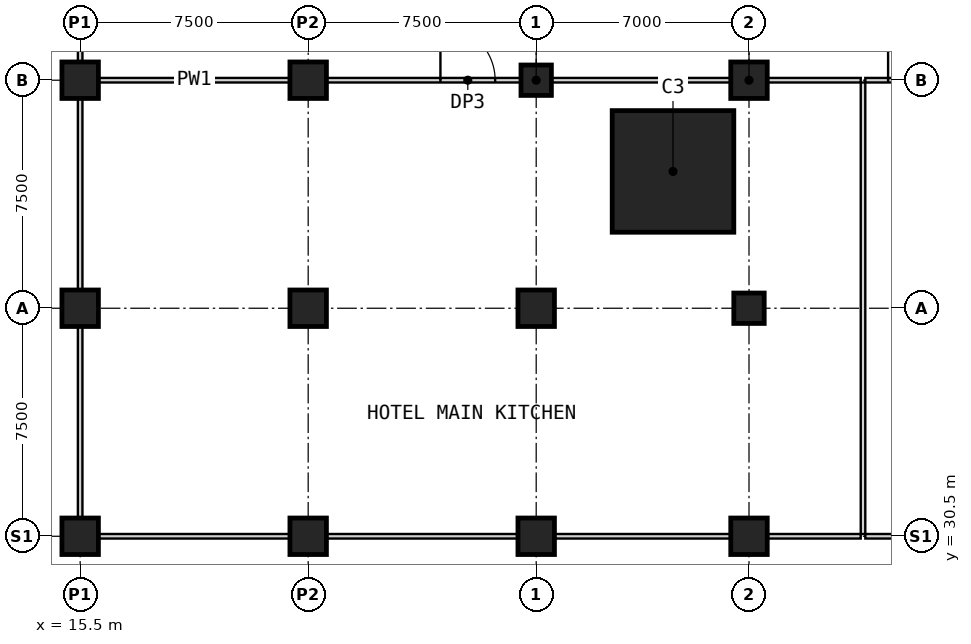
"""IFC4 building model, lengths in metres.
Left out: names, types, materials, properties, quantities, classifications, styles, units other than length and angle.
Written with IfcOpenShell. Run it as: python <this file> out.ifc"""

import sys

from ifc_helpers import new_model, si_unit, direction, frame, frame_2d, origin, origin_2d, place, context, subcontext, project, spatial, rectangle, extrude, element, fill, save


model = new_model("IFC4")
c1 = context("Model", 3, precision=1e-05, world=origin(), true_north=direction((0.0, 1.0)))
c2 = subcontext(c1, "Body", "Model", "MODEL_VIEW")
j1 = project(units=[si_unit("LENGTHUNIT", "METRE"), si_unit("PLANEANGLEUNIT", "RADIAN")], contexts=[c1])
p1 = place(None, origin())
s1 = spatial("IfcSite", under=j1, at=p1, CompositionType="ELEMENT")
p2 = place(p1, origin())
s2 = spatial("IfcBuilding", under=s1, at=p2, CompositionType="ELEMENT")
p3 = place(p2, frame((0.0, 0.0, -6.0)))
s3 = spatial("IfcBuildingStorey", under=s2, at=p3, CompositionType="ELEMENT", Elevation=-6.0)
for number, where, z_axis, x_axis in (
    (1, (30.5, 45.5, 0.0), (0.0, 0.0, 1.0), (1.0, 0.0, 0.0)),
    (2, (37.5, 38.0, 0.0), (0.0, 0.0, 1.0), (1.0, 0.0, 0.0)),
):
    element("IfcColumn", number, at=place(p3, frame(where, z_axis=z_axis, x_axis=x_axis)), inside=s3, PredefinedType="COLUMN", context=c2, shape_type="SweptSolid", body=[
        extrude(rectangle(XDim=1.0, YDim=1.0, at=origin_2d()), origin(), (0.0, 0.0, 1.0), 6.0),
    ])
p4 = place(p3, frame((37.5, 45.5, 0.0), z_axis=(0.0, 0.0, 1.0), x_axis=(1.0, 0.0, 0.0)))
e3 = element("IfcColumn", 3, at=p4, inside=s3, PredefinedType="COLUMN", context=c2, shape_type="SweptSolid", body=[
    extrude(rectangle(XDim=1.2, YDim=1.2, at=origin_2d()), origin(), (0.0, 0.0, 1.0), 6.0),
])
p5 = place(p3, frame((35.0, 42.5, 0.0), z_axis=(0.0, 0.0, 1.0), x_axis=(1.0, 0.0, 0.0)))
e4 = element("IfcColumn", 4, at=p5, inside=s3, PredefinedType="COLUMN", context=c2, shape_type="SweptSolid", body=[
    extrude(rectangle(XDim=4.0, YDim=4.0, at=origin_2d()), origin(), (0.0, 0.0, 1.0), 6.0),
])
for number, where, z_axis, x_axis in (
    (5, (15.5, 30.5, 0.0), (0.0, 0.0, 1.0), (1.0, 0.0, 0.0)),
    (6, (15.5, 38.0, 0.0), (0.0, 0.0, 1.0), (1.0, 0.0, 0.0)),
    (7, (15.5, 45.5, 0.0), (0.0, 0.0, 1.0), (1.0, 0.0, 0.0)),
    (8, (23.0, 30.5, 0.0), (0.0, 0.0, 1.0), (1.0, 0.0, 0.0)),
    (9, (23.0, 38.0, 0.0), (0.0, 0.0, 1.0), (1.0, 0.0, 0.0)),
    (10, (23.0, 45.5, 0.0), (0.0, 0.0, 1.0), (1.0, 0.0, 0.0)),
    (11, (30.5, 30.5, 0.0), (0.0, 0.0, 1.0), (1.0, 0.0, 0.0)),
    (12, (30.5, 38.0, 0.0), (0.0, 0.0, 1.0), (1.0, 0.0, 0.0)),
    (13, (37.5, 30.5, 0.0), (0.0, 0.0, 1.0), (1.0, 0.0, 0.0)),
):
    element("IfcColumn", number, at=place(p3, frame(where, z_axis=z_axis, x_axis=x_axis)), inside=s3, PredefinedType="COLUMN", context=c2, shape_type="SweptSolid", body=[
        extrude(rectangle(XDim=1.2, YDim=1.2, at=origin_2d()), origin(), (0.0, 0.0, 1.0), 6.0),
    ])
p6 = place(p3, frame((16.1, 45.5, 0.0), z_axis=(0.0, 0.0, 1.0), x_axis=(1.0, 0.0, 0.0)))
e14 = element("IfcWall", 14, at=p6, inside=s3, PredefinedType="PARTITIONING", context=c2, shape_type="SweptSolid", body=[
    extrude(rectangle(XDim=6.3, YDim=0.15, at=frame_2d((3.15, 0.0))), origin(), (0.0, 0.0, 1.0), 5.7),
])
p7 = place(p3, frame((23.6, 45.5, 0.0), z_axis=(0.0, 0.0, 1.0), x_axis=(1.0, 0.0, 0.0)))
e15 = element("IfcWall", 15, at=p7, inside=s3, PredefinedType="PARTITIONING", context=c2, shape_type="SweptSolid", body=[
    extrude(rectangle(XDim=6.4, YDim=0.15, at=frame_2d((3.2, 0.0))), origin(), (0.0, 0.0, 1.0), 5.7),
])
p8 = place(p7, frame((3.75, 0.0, 0.0)))
e16 = element("IfcOpeningElement", 16, at=p8, cuts=e15, PredefinedType="OPENING", context=c2, shape_type="SweptSolid", body=[
    extrude(rectangle(XDim=1.8, YDim=2.4, at=frame_2d((0.9, 1.2))), frame((0.0, 0.085, 0.0), z_axis=(0.0, -1.0, 0.0), x_axis=(1.0, 0.0, 0.0)), (0.0, 0.0, 1.0), 0.17),
])
p9 = place(p3, frame((31.0, 45.5, 0.0), z_axis=(0.0, 0.0, 1.0), x_axis=(1.0, 0.0, 0.0)))
e17 = element("IfcWall", 17, at=p9, inside=s3, PredefinedType="PARTITIONING", context=c2, shape_type="SweptSolid", body=[
    extrude(rectangle(XDim=5.9, YDim=0.15, at=frame_2d((2.95, 0.0))), origin(), (0.0, 0.0, 1.0), 5.7),
])
p10 = place(p3, frame((38.1, 45.5, 0.0), z_axis=(0.0, 0.0, 1.0), x_axis=(1.0, 0.0, 0.0)))
e18 = element("IfcWall", 18, at=p10, inside=s3, PredefinedType="PARTITIONING", context=c2, shape_type="SweptSolid", body=[
    extrude(rectangle(XDim=3.075, YDim=0.15, at=frame_2d((1.538, 0.0))), origin(), (0.0, 0.0, 1.0), 5.7),
])
p11 = place(p3, frame((41.325, 45.5, 0.0), z_axis=(0.0, 0.0, 1.0), x_axis=(1.0, 0.0, 0.0)))
e19 = element("IfcWall", 19, at=p11, inside=s3, PredefinedType="PARTITIONING", context=c2, shape_type="SweptSolid", body=[
    extrude(rectangle(XDim=3.075, YDim=0.15, at=frame_2d((1.538, 0.0))), origin(), (0.0, 0.0, 1.0), 5.7),
])
p12 = place(p11, frame((0.75, 0.0, 0.0)))
e20 = element("IfcOpeningElement", 20, at=p12, cuts=e19, PredefinedType="OPENING", context=c2, shape_type="SweptSolid", body=[
    extrude(rectangle(XDim=1.8, YDim=2.4, at=frame_2d((0.9, 1.2))), frame((0.0, 0.085, 0.0), z_axis=(0.0, -1.0, 0.0), x_axis=(1.0, 0.0, 0.0)), (0.0, 0.0, 1.0), 0.17),
])
for number, where, z_axis, x_axis in (
    (21, (16.1, 30.5, 0.0), (0.0, 0.0, 1.0), (1.0, 0.0, 0.0)),
    (22, (23.6, 30.5, 0.0), (0.0, 0.0, 1.0), (1.0, 0.0, 0.0)),
):
    element("IfcWall", number, at=place(p3, frame(where, z_axis=z_axis, x_axis=x_axis)), inside=s3, PredefinedType="PARTITIONING", context=c2, shape_type="SweptSolid", body=[
        extrude(rectangle(XDim=6.3, YDim=0.15, at=frame_2d((3.15, 0.0))), origin(), (0.0, 0.0, 1.0), 5.1),
    ])
p13 = place(p3, frame((31.1, 30.5, 0.0), z_axis=(0.0, 0.0, 1.0), x_axis=(1.0, 0.0, 0.0)))
e23 = element("IfcWall", 23, at=p13, inside=s3, PredefinedType="PARTITIONING", context=c2, shape_type="SweptSolid", body=[
    extrude(rectangle(XDim=5.8, YDim=0.15, at=frame_2d((2.9, 0.0))), origin(), (0.0, 0.0, 1.0), 5.1),
])
for number, where, z_axis, x_axis in (
    (24, (38.1, 30.5, 0.0), (0.0, 0.0, 1.0), (1.0, 0.0, 0.0)),
    (25, (41.325, 30.5, 0.0), (0.0, 0.0, 1.0), (1.0, 0.0, 0.0)),
):
    element("IfcWall", number, at=place(p3, frame(where, z_axis=z_axis, x_axis=x_axis)), inside=s3, PredefinedType="PARTITIONING", context=c2, shape_type="SweptSolid", body=[
        extrude(rectangle(XDim=3.075, YDim=0.15, at=frame_2d((1.538, 0.0))), origin(), (0.0, 0.0, 1.0), 5.1),
    ])
for number, where, z_axis, x_axis in (
    (26, (15.5, 31.1, 0.0), (0.0, 0.0, 1.0), (0.0, 1.0, 0.0)),
    (27, (15.5, 38.6, 0.0), (0.0, 0.0, 1.0), (0.0, 1.0, 0.0)),
):
    element("IfcWall", number, at=place(p3, frame(where, z_axis=z_axis, x_axis=x_axis)), inside=s3, PredefinedType="PARTITIONING", context=c2, shape_type="SweptSolid", body=[
        extrude(rectangle(XDim=6.3, YDim=0.15, at=frame_2d((3.15, 0.0))), origin(), (0.0, 0.0, 1.0), 5.1),
    ])
p14 = place(p3, frame((15.5, 46.1, 0.0), z_axis=(0.0, 0.0, 1.0), x_axis=(0.0, 1.0, 0.0)))
e28 = element("IfcWall", 28, at=p14, inside=s3, PredefinedType="PARTITIONING", context=c2, shape_type="SweptSolid", body=[
    extrude(rectangle(XDim=5.8, YDim=0.15, at=frame_2d((2.9, 0.0))), origin(), (0.0, 0.0, 1.0), 5.1),
])
p15 = place(p3, frame((41.25, 30.575, 0.0), z_axis=(0.0, 0.0, 1.0), x_axis=(0.0, 1.0, 0.0)))
e29 = element("IfcWall", 29, at=p15, inside=s3, PredefinedType="PARTITIONING", context=c2, shape_type="SweptSolid", body=[
    extrude(rectangle(XDim=14.85, YDim=0.15, at=frame_2d((7.425, 0.0))), origin(), (0.0, 0.0, 1.0), 5.1),
])
p16 = place(p8, origin())
e30 = element("IfcDoor", 30, at=p16, inside=s3, OperationType="SINGLE_SWING_LEFT", PredefinedType="DOOR", context=c2, shape_type="SweptSolid", body=[
    extrude(rectangle(XDim=1.8, YDim=2.4, at=frame_2d((0.9, 1.2))), frame((0.0, 0.025, 0.0), z_axis=(0.0, -1.0, 0.0), x_axis=(1.0, 0.0, 0.0)), (0.0, 0.0, 1.0), 0.05),
])
fill(e16, e30)
p17 = place(p12, origin())
e31 = element("IfcDoor", 31, at=p17, inside=s3, OperationType="SINGLE_SWING_LEFT", PredefinedType="DOOR", context=c2, shape_type="SweptSolid", body=[
    extrude(rectangle(XDim=1.8, YDim=2.4, at=frame_2d((0.9, 1.2))), frame((0.0, 0.025, 0.0), z_axis=(0.0, -1.0, 0.0), x_axis=(1.0, 0.0, 0.0)), (0.0, 0.0, 1.0), 0.05),
])
fill(e20, e31)
save(model, sys.argv[1])
